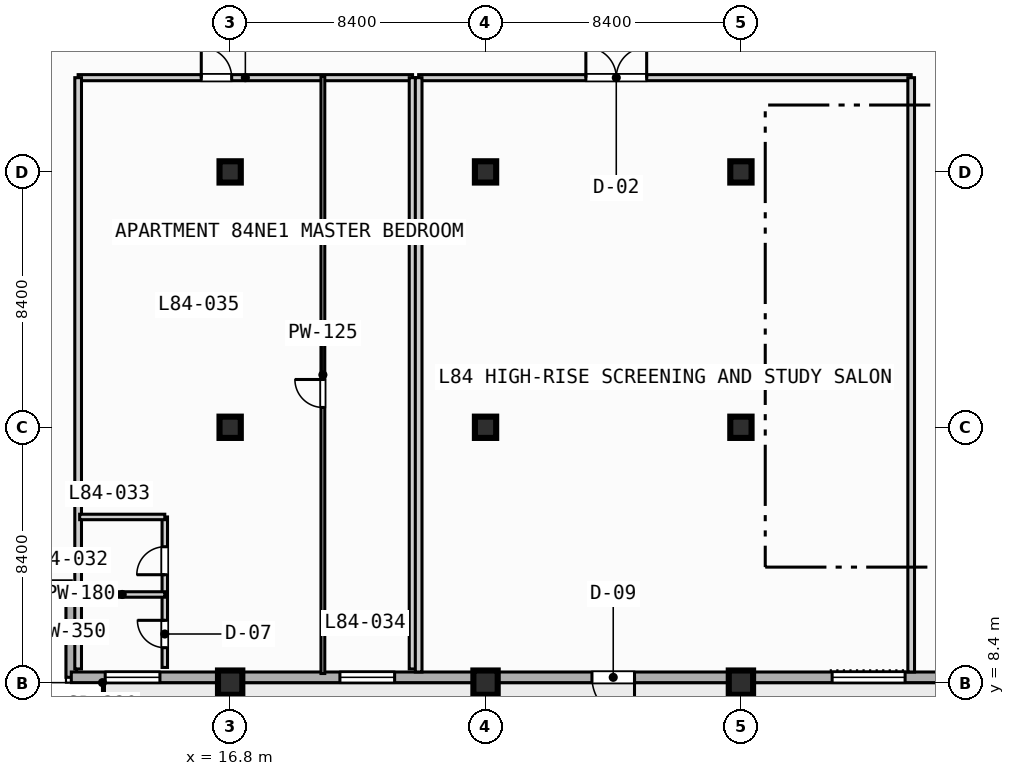
"""IFC4 building model, lengths in metres.
Left out: names, types, materials, properties, quantities, classifications, styles, units other than length and angle.
Written with IfcOpenShell. Run it as: python <this file> out.ifc"""

import sys

from ifc_helpers import new_model, si_unit, direction, frame, frame_2d, origin, origin_2d, place, context, subcontext, project, spatial, rectangle, extrude, element, fill, save


model = new_model("IFC4")
c1 = context("Model", 3, precision=1e-05, world=origin(), true_north=direction((0.0, 1.0)))
c2 = subcontext(c1, "Body", "Model", "MODEL_VIEW")
j1 = project(units=[si_unit("LENGTHUNIT", "METRE"), si_unit("PLANEANGLEUNIT", "RADIAN")], contexts=[c1])
p1 = place(None, origin())
s1 = spatial("IfcSite", under=j1, at=p1, CompositionType="ELEMENT")
p2 = place(p1, origin())
s2 = spatial("IfcBuilding", under=s1, at=p2, CompositionType="ELEMENT")
p3 = place(p2, frame((0.0, 0.0, 339.8)))
s3 = spatial("IfcBuildingStorey", under=s2, at=p3, CompositionType="ELEMENT", Elevation=339.8)
p4 = place(p3, frame((16.8, 8.4, 0.0), z_axis=(0.0, 0.0, 1.0), x_axis=(1.0, 0.0, 0.0)))
e1 = element("IfcColumn", 1, at=p4, inside=s3, PredefinedType="COLUMN", context=c2, shape_type="SweptSolid", body=[
    extrude(rectangle(XDim=0.8, YDim=0.8, at=origin_2d()), origin(), (0.0, 0.0, 1.0), 3.9),
])
for number, where, z_axis, x_axis in (
    (2, (16.8, 16.8, 0.0), (0.0, 0.0, 1.0), (1.0, 0.0, 0.0)),
    (3, (16.8, 25.2, 0.0), (0.0, 0.0, 1.0), (1.0, 0.0, 0.0)),
):
    element("IfcColumn", number, at=place(p3, frame(where, z_axis=z_axis, x_axis=x_axis)), inside=s3, PredefinedType="COLUMN", context=c2, shape_type="SweptSolid", body=[
        extrude(rectangle(XDim=0.7, YDim=0.7, at=origin_2d()), origin(), (0.0, 0.0, 1.0), 3.9),
    ])
p5 = place(p3, frame((25.2, 8.4, 0.0), z_axis=(0.0, 0.0, 1.0), x_axis=(1.0, 0.0, 0.0)))
e4 = element("IfcColumn", 4, at=p5, inside=s3, PredefinedType="COLUMN", context=c2, shape_type="SweptSolid", body=[
    extrude(rectangle(XDim=0.8, YDim=0.8, at=origin_2d()), origin(), (0.0, 0.0, 1.0), 3.9),
])
for number, where, z_axis, x_axis in (
    (5, (25.2, 16.8, 0.0), (0.0, 0.0, 1.0), (1.0, 0.0, 0.0)),
    (6, (25.2, 25.2, 0.0), (0.0, 0.0, 1.0), (1.0, 0.0, 0.0)),
):
    element("IfcColumn", number, at=place(p3, frame(where, z_axis=z_axis, x_axis=x_axis)), inside=s3, PredefinedType="COLUMN", context=c2, shape_type="SweptSolid", body=[
        extrude(rectangle(XDim=0.7, YDim=0.7, at=origin_2d()), origin(), (0.0, 0.0, 1.0), 3.9),
    ])
p6 = place(p3, frame((33.6, 8.4, 0.0), z_axis=(0.0, 0.0, 1.0), x_axis=(1.0, 0.0, 0.0)))
e7 = element("IfcColumn", 7, at=p6, inside=s3, PredefinedType="COLUMN", context=c2, shape_type="SweptSolid", body=[
    extrude(rectangle(XDim=0.8, YDim=0.8, at=origin_2d()), origin(), (0.0, 0.0, 1.0), 3.9),
])
for number, where, z_axis, x_axis in (
    (8, (33.6, 16.8, 0.0), (0.0, 0.0, 1.0), (1.0, 0.0, 0.0)),
    (9, (33.6, 25.2, 0.0), (0.0, 0.0, 1.0), (1.0, 0.0, 0.0)),
):
    element("IfcColumn", number, at=place(p3, frame(where, z_axis=z_axis, x_axis=x_axis)), inside=s3, PredefinedType="COLUMN", context=c2, shape_type="SweptSolid", body=[
        extrude(rectangle(XDim=0.7, YDim=0.7, at=origin_2d()), origin(), (0.0, 0.0, 1.0), 3.9),
    ])
for number, where, z_axis, x_axis in (
    (10, (11.575, 8.575, 0.0), (0.0, 0.0, 1.0), (0.0, 1.0, 0.0)),
    (11, (11.575, 11.575, 0.0), (0.0, 0.0, 1.0), (-1.0, 0.0, 0.0)),
):
    element("IfcWall", number, at=place(p3, frame(where, z_axis=z_axis, x_axis=x_axis)), inside=s3, PredefinedType="STANDARD", context=c2, shape_type="SweptSolid", body=[
        extrude(rectangle(XDim=3.0, YDim=0.35, at=frame_2d((1.5, 0.0))), origin(), (0.0, 0.0, 1.0), 3.67),
    ])
p7 = place(p3, frame((64.025, 8.575, 0.0), z_axis=(0.0, 0.0, 1.0), x_axis=(-1.0, 0.0, 0.0)))
e12 = element("IfcWall", 12, at=p7, inside=s3, PredefinedType="STANDARD", context=c2, shape_type="SweptSolid", body=[
    extrude(rectangle(XDim=52.45, YDim=0.35, at=frame_2d((26.225, 0.0))), origin(), (0.0, 0.0, 1.0), 3.67),
])
p8 = place(p7, frame((33.925, 0.0, 0.0)))
e13 = element("IfcOpeningElement", 13, at=p8, cuts=e12, PredefinedType="OPENING", context=c2, shape_type="SweptSolid", body=[
    extrude(rectangle(XDim=1.4, YDim=2.2, at=frame_2d((0.7, 1.1))), frame((0.0, 0.185, 0.0), z_axis=(0.0, -1.0, 0.0), x_axis=(1.0, 0.0, 0.0)), (0.0, 0.0, 1.0), 0.37),
])
p9 = place(p7, frame((25.025, 0.0, 0.85)))
e14 = element("IfcOpeningElement", 14, at=p9, cuts=e12, PredefinedType="OPENING", context=c2, shape_type="SweptSolid", body=[
    extrude(rectangle(XDim=2.4, YDim=1.95, at=frame_2d((1.2, 0.975))), frame((0.0, 0.185, 0.0), z_axis=(0.0, -1.0, 0.0), x_axis=(1.0, 0.0, 0.0)), (0.0, 0.0, 1.0), 0.37),
])
p10 = place(p7, frame((16.925, 0.0, 0.85)))
e15 = element("IfcOpeningElement", 15, at=p10, cuts=e12, PredefinedType="OPENING", context=c2, shape_type="SweptSolid", body=[
    extrude(rectangle(XDim=1.8, YDim=1.8, at=frame_2d((0.9, 0.9))), frame((0.0, 0.185, 0.0), z_axis=(0.0, -1.0, 0.0), x_axis=(1.0, 0.0, 0.0)), (0.0, 0.0, 1.0), 0.37),
])
p11 = place(p7, frame((41.815, 0.0, 0.85)))
e16 = element("IfcOpeningElement", 16, at=p11, cuts=e12, PredefinedType="OPENING", context=c2, shape_type="SweptSolid", body=[
    extrude(rectangle(XDim=1.8, YDim=1.8, at=frame_2d((0.9, 0.9))), frame((0.0, 0.185, 0.0), z_axis=(0.0, -1.0, 0.0), x_axis=(1.0, 0.0, 0.0)), (0.0, 0.0, 1.0), 0.37),
])
p12 = place(p7, frame((49.535, 0.0, 0.85)))
e17 = element("IfcOpeningElement", 17, at=p12, cuts=e12, PredefinedType="OPENING", context=c2, shape_type="SweptSolid", body=[
    extrude(rectangle(XDim=1.8, YDim=1.8, at=frame_2d((0.9, 0.9))), frame((0.0, 0.185, 0.0), z_axis=(0.0, -1.0, 0.0), x_axis=(1.0, 0.0, 0.0)), (0.0, 0.0, 1.0), 0.37),
])
p13 = place(p3, frame((11.8, 28.3, 0.0), z_axis=(0.0, 0.0, 1.0), x_axis=(1.0, 0.0, 0.0)))
e18 = element("IfcWall", 18, at=p13, inside=s3, PredefinedType="PARTITIONING", context=c2, shape_type="SweptSolid", body=[
    extrude(rectangle(XDim=11.0, YDim=0.2, at=frame_2d((5.5, 0.0))), origin(), (0.0, 0.0, 1.0), 3.67),
])
p14 = place(p13, frame((4.05, 0.0, 0.0)))
e19 = element("IfcOpeningElement", 19, at=p14, cuts=e18, PredefinedType="OPENING", context=c2, shape_type="SweptSolid", body=[
    extrude(rectangle(XDim=1.0, YDim=2.15, at=frame_2d((0.5, 1.075))), frame((0.0, 0.11, 0.0), z_axis=(0.0, -1.0, 0.0), x_axis=(1.0, 0.0, 0.0)), (0.0, 0.0, 1.0), 0.22),
])
for number, where, z_axis, x_axis in (
    (20, (22.8, 8.85, 0.0), (0.0, 0.0, 1.0), (0.0, 1.0, 0.0)),
    (21, (11.8, 8.85, 0.0), (0.0, 0.0, 1.0), (0.0, 1.0, 0.0)),
):
    element("IfcWall", number, at=place(p3, frame(where, z_axis=z_axis, x_axis=x_axis)), inside=s3, PredefinedType="PARTITIONING", context=c2, shape_type="SweptSolid", body=[
        extrude(rectangle(XDim=19.45, YDim=0.22, at=frame_2d((9.725, 0.0))), origin(), (0.0, 0.0, 1.0), 3.67),
    ])
p15 = place(p3, frame((14.65, 8.9, 0.0), z_axis=(0.0, 0.0, 1.0), x_axis=(0.0, 1.0, 0.0)))
e22 = element("IfcWall", 22, at=p15, inside=s3, PredefinedType="PLUMBINGWALL", context=c2, shape_type="SweptSolid", body=[
    extrude(rectangle(XDim=4.95, YDim=0.18, at=frame_2d((2.475, 0.0))), origin(), (0.0, 0.0, 1.0), 3.67),
])
p16 = place(p15, frame((0.65, 0.0, 0.0)))
e23 = element("IfcOpeningElement", 23, at=p16, cuts=e22, PredefinedType="OPENING", context=c2, shape_type="SweptSolid", body=[
    extrude(rectangle(XDim=0.9, YDim=2.1, at=frame_2d((0.45, 1.05))), frame((0.0, 0.1, 0.0), z_axis=(0.0, -1.0, 0.0), x_axis=(1.0, 0.0, 0.0)), (0.0, 0.0, 1.0), 0.2),
])
p17 = place(p15, frame((3.05, 0.0, 0.0)))
e24 = element("IfcOpeningElement", 24, at=p17, cuts=e22, PredefinedType="OPENING", context=c2, shape_type="SweptSolid", body=[
    extrude(rectangle(XDim=0.92, YDim=2.1, at=frame_2d((0.46, 1.05))), frame((0.0, 0.1, 0.0), z_axis=(0.0, -1.0, 0.0), x_axis=(1.0, 0.0, 0.0)), (0.0, 0.0, 1.0), 0.2),
])
for number, where, z_axis, x_axis in (
    (25, (11.85, 11.3, 0.0), (0.0, 0.0, 1.0), (1.0, 0.0, 0.0)),
    (26, (11.85, 13.85, 0.0), (0.0, 0.0, 1.0), (1.0, 0.0, 0.0)),
):
    element("IfcWall", number, at=place(p3, frame(where, z_axis=z_axis, x_axis=x_axis)), inside=s3, PredefinedType="PLUMBINGWALL", context=c2, shape_type="SweptSolid", body=[
        extrude(rectangle(XDim=2.8, YDim=0.18, at=frame_2d((1.4, 0.0))), origin(), (0.0, 0.0, 1.0), 3.67),
    ])
p18 = place(p3, frame((19.85, 8.7, 0.0), z_axis=(0.0, 0.0, 1.0), x_axis=(0.0, 1.0, 0.0)))
e27 = element("IfcWall", 27, at=p18, inside=s3, PredefinedType="PARTITIONING", context=c2, shape_type="SweptSolid", body=[
    extrude(rectangle(XDim=19.65, YDim=0.125, at=frame_2d((9.825, 0.0))), origin(), (0.0, 0.0, 1.0), 3.67),
])
p19 = place(p18, frame((8.752, 0.0, 0.0)))
e28 = element("IfcOpeningElement", 28, at=p19, cuts=e27, PredefinedType="OPENING", context=c2, shape_type="SweptSolid", body=[
    extrude(rectangle(XDim=0.92, YDim=2.1, at=frame_2d((0.46, 1.05))), frame((0.0, 0.073, 0.0), z_axis=(0.0, -1.0, 0.0), x_axis=(1.0, 0.0, 0.0)), (0.0, 0.0, 1.0), 0.145),
])
p20 = place(p3, frame((23.0, 28.3, 0.0), z_axis=(0.0, 0.0, 1.0), x_axis=(1.0, 0.0, 0.0)))
e29 = element("IfcWall", 29, at=p20, inside=s3, PredefinedType="PARTITIONING", context=c2, shape_type="SweptSolid", body=[
    extrude(rectangle(XDim=16.2, YDim=0.2, at=frame_2d((8.1, 0.0))), origin(), (0.0, 0.0, 1.0), 3.67),
])
p21 = place(p20, frame((5.5, 0.0, 0.0)))
e30 = element("IfcOpeningElement", 30, at=p21, cuts=e29, PredefinedType="OPENING", context=c2, shape_type="SweptSolid", body=[
    extrude(rectangle(XDim=2.0, YDim=2.15, at=frame_2d((1.0, 1.075))), frame((0.0, 0.11, 0.0), z_axis=(0.0, -1.0, 0.0), x_axis=(1.0, 0.0, 0.0)), (0.0, 0.0, 1.0), 0.22),
])
for number, where, z_axis, x_axis in (
    (31, (23.0, 8.75, 0.0), (0.0, 0.0, 1.0), (0.0, 1.0, 0.0)),
    (32, (39.2, 8.75, 0.0), (0.0, 0.0, 1.0), (0.0, 1.0, 0.0)),
):
    element("IfcWall", number, at=place(p3, frame(where, z_axis=z_axis, x_axis=x_axis)), inside=s3, PredefinedType="PARTITIONING", context=c2, shape_type="SweptSolid", body=[
        extrude(rectangle(XDim=19.55, YDim=0.22, at=frame_2d((9.775, 0.0))), origin(), (0.0, 0.0, 1.0), 3.67),
    ])
p22 = place(p8, origin())
e33 = element("IfcDoor", 33, at=p22, inside=s3, OperationType="SINGLE_SWING_LEFT", PredefinedType="DOOR", context=c2, shape_type="SweptSolid", body=[
    extrude(rectangle(XDim=1.4, YDim=2.2, at=frame_2d((0.7, 1.1))), frame((0.0, 0.025, 0.0), z_axis=(0.0, -1.0, 0.0), x_axis=(1.0, 0.0, 0.0)), (0.0, 0.0, 1.0), 0.05),
])
fill(e13, e33)
p23 = place(p9, origin())
e34 = element("IfcWindow", 34, at=p23, inside=s3, PartitioningType="SINGLE_PANEL", PredefinedType="WINDOW", context=c2, shape_type="SweptSolid", body=[
    extrude(rectangle(XDim=2.4, YDim=1.95, at=frame_2d((1.2, 0.975))), frame((0.0, 0.03, 0.0), z_axis=(0.0, -1.0, 0.0), x_axis=(1.0, 0.0, 0.0)), (0.0, 0.0, 1.0), 0.06),
])
fill(e14, e34)
p24 = place(p11, origin())
e35 = element("IfcWindow", 35, at=p24, inside=s3, PartitioningType="SINGLE_PANEL", PredefinedType="WINDOW", context=c2, shape_type="SweptSolid", body=[
    extrude(rectangle(XDim=1.8, YDim=1.8, at=frame_2d((0.9, 0.9))), frame((0.0, 0.03, 0.0), z_axis=(0.0, -1.0, 0.0), x_axis=(1.0, 0.0, 0.0)), (0.0, 0.0, 1.0), 0.06),
])
fill(e16, e35)
p25 = place(p12, origin())
e36 = element("IfcWindow", 36, at=p25, inside=s3, PartitioningType="SINGLE_PANEL", PredefinedType="WINDOW", context=c2, shape_type="SweptSolid", body=[
    extrude(rectangle(XDim=1.8, YDim=1.8, at=frame_2d((0.9, 0.9))), frame((0.0, 0.03, 0.0), z_axis=(0.0, -1.0, 0.0), x_axis=(1.0, 0.0, 0.0)), (0.0, 0.0, 1.0), 0.06),
])
fill(e17, e36)
p26 = place(p14, origin())
e37 = element("IfcDoor", 37, at=p26, inside=s3, OperationType="SINGLE_SWING_LEFT", PredefinedType="DOOR", context=c2, shape_type="SweptSolid", body=[
    extrude(rectangle(XDim=1.0, YDim=2.15, at=frame_2d((0.5, 1.075))), frame((0.0, 0.025, 0.0), z_axis=(0.0, -1.0, 0.0), x_axis=(1.0, 0.0, 0.0)), (0.0, 0.0, 1.0), 0.05),
])
fill(e19, e37)
p27 = place(p16, origin())
e38 = element("IfcDoor", 38, at=p27, inside=s3, OperationType="SINGLE_SWING_RIGHT", PredefinedType="DOOR", context=c2, shape_type="SweptSolid", body=[
    extrude(rectangle(XDim=0.9, YDim=2.1, at=frame_2d((0.45, 1.05))), frame((0.0, 0.025, 0.0), z_axis=(0.0, -1.0, 0.0), x_axis=(1.0, 0.0, 0.0)), (0.0, 0.0, 1.0), 0.05),
])
fill(e23, e38)
p28 = place(p17, origin())
e39 = element("IfcDoor", 39, at=p28, inside=s3, OperationType="SINGLE_SWING_LEFT", PredefinedType="DOOR", context=c2, shape_type="SweptSolid", body=[
    extrude(rectangle(XDim=0.92, YDim=2.1, at=frame_2d((0.46, 1.05))), frame((0.0, 0.025, 0.0), z_axis=(0.0, -1.0, 0.0), x_axis=(1.0, 0.0, 0.0)), (0.0, 0.0, 1.0), 0.05),
])
fill(e24, e39)
p29 = place(p19, origin())
e40 = element("IfcDoor", 40, at=p29, inside=s3, OperationType="SINGLE_SWING_RIGHT", PredefinedType="DOOR", context=c2, shape_type="SweptSolid", body=[
    extrude(rectangle(XDim=0.92, YDim=2.1, at=frame_2d((0.46, 1.05))), frame((0.0, 0.025, 0.0), z_axis=(0.0, -1.0, 0.0), x_axis=(1.0, 0.0, 0.0)), (0.0, 0.0, 1.0), 0.05),
])
fill(e28, e40)
p30 = place(p21, origin())
e41 = element("IfcDoor", 41, at=p30, inside=s3, OperationType="SINGLE_SWING_LEFT", PredefinedType="DOOR", context=c2, shape_type="SweptSolid", body=[
    extrude(rectangle(XDim=2.0, YDim=2.15, at=frame_2d((1.0, 1.075))), frame((0.0, 0.025, 0.0), z_axis=(0.0, -1.0, 0.0), x_axis=(1.0, 0.0, 0.0)), (0.0, 0.0, 1.0), 0.05),
])
fill(e30, e41)
save(model, sys.argv[1])
